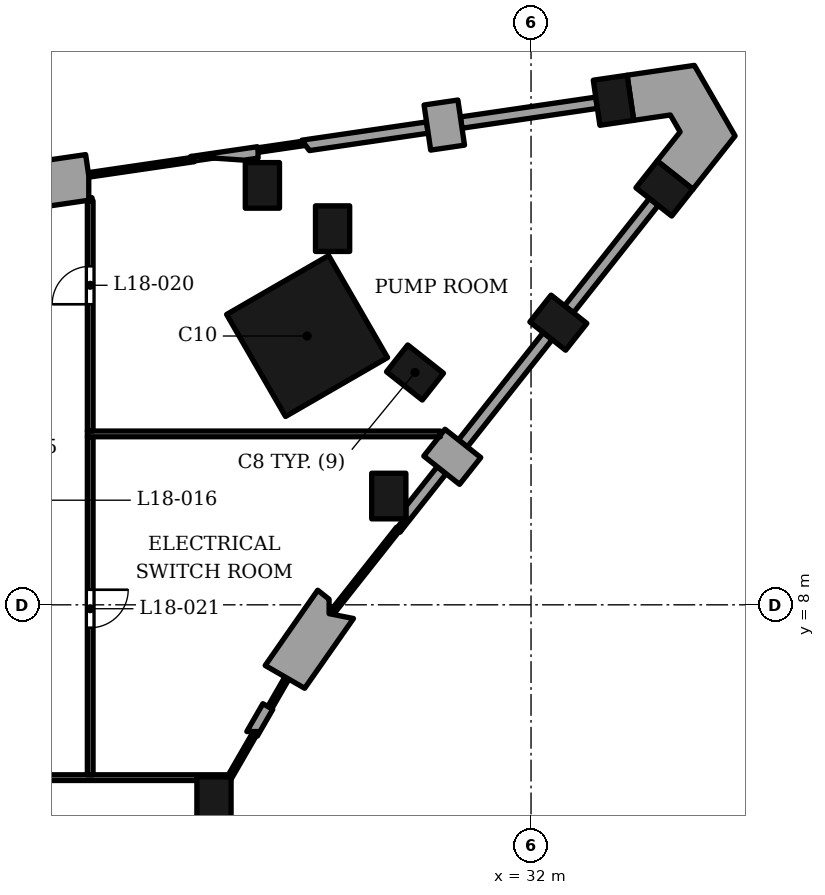
"""IFC4 building model, lengths in metres.
Left out: names, types, materials, properties, quantities, classifications, styles, units other than length and angle.
Written with IfcOpenShell. Run it as: python <this file> out.ifc"""

import sys

from ifc_helpers import new_model, si_unit, direction, frame, frame_2d, origin, origin_2d, place, context, subcontext, project, spatial, polyline, rectangle, outline, extrude, clip, halfspace, element, fill, save


model = new_model("IFC4")
c1 = context("Model", 3, precision=1e-05, world=origin(), true_north=direction((0.0, 1.0)))
c2 = subcontext(c1, "Body", "Model", "MODEL_VIEW")
j1 = project(units=[si_unit("LENGTHUNIT", "METRE"), si_unit("PLANEANGLEUNIT", "RADIAN")], contexts=[c1])
p1 = place(None, origin())
s1 = spatial("IfcSite", under=j1, at=p1, CompositionType="ELEMENT")
p2 = place(p1, origin())
s2 = spatial("IfcBuilding", under=s1, at=p2, CompositionType="ELEMENT")
p3 = place(p2, frame((0.0, 0.0, 86.8)))
s3 = spatial("IfcBuildingStorey", under=s2, at=p3, CompositionType="ELEMENT", Elevation=86.8)
p4 = place(p3, frame((28.947, 14.113, 0.0), z_axis=(0.0, 0.0, 1.0), x_axis=(0.620301172202, 0.784363726701, 0.0)))
e1 = element("IfcColumn", 1, at=p4, inside=s3, PredefinedType="COLUMN", context=c2, shape_type="SweptSolid", body=[
    extrude(rectangle(XDim=0.9, YDim=1.2, at=origin_2d()), origin(), (0.0, 0.0, 1.0), 5.0),
])
p5 = place(p3, frame((26.107, 15.073, 0.0), z_axis=(0.0, 0.0, 1.0), x_axis=(-0.866025447418, -0.499999924425, 0.0)))
e2 = element("IfcColumn", 2, at=p5, inside=s3, PredefinedType="COLUMN", context=c2, shape_type="SweptSolid", body=[
    extrude(rectangle(XDim=3.1, YDim=3.1, at=origin_2d()), origin(), (0.0, 0.0, 1.0), 5.0),
])
for number, where, z_axis, x_axis in (
    (3, (32.719, 15.424, 0.0), (0.0, 0.0, 1.0), (0.62, 0.784, 0.0)),
    (4, (35.51, 18.954, 0.0), (0.0, 0.0, 1.0), (0.62, 0.784, 0.0)),
    (5, (34.17, 21.276, 0.0), (0.0, 0.0, 1.0), (-0.989, -0.145, 0.0)),
):
    element("IfcColumn", number, at=place(p3, frame(where, z_axis=z_axis, x_axis=x_axis)), inside=s3, PredefinedType="COLUMN", context=c2, shape_type="SweptSolid", body=[
        extrude(rectangle(XDim=0.9, YDim=1.2, at=origin_2d()), origin(), (0.0, 0.0, 1.0), 5.0),
    ])
p6 = place(p3, frame((23.657, 2.871, 0.0), z_axis=(0.133016898304, 0.230355520277, 0.963972426495), x_axis=(-0.865991092016, 0.500059425018, 0.0)))
e6 = element("IfcColumn", 6, at=p6, inside=s3, PredefinedType="COLUMN", context=c2, shape_type="Clipping", body=[
    clip(clip(extrude(rectangle(XDim=0.9, YDim=1.2, at=origin_2d()), origin(), (0.0, 0.0, 1.0), 5.187), halfspace(frame((0.0, 0.0, 0.17), z_axis=(0.0, 0.0, 1.0), x_axis=(1.0, 0.0, 0.0)), True)), halfspace(frame((0.0, 0.0, 5.017), z_axis=(0.0, 0.0, 1.0), x_axis=(1.0, 0.0, 0.0)), False)),
])
p7 = place(p3, frame((28.257, 10.862, 0.0), z_axis=(-0.196705937317, -0.437790653176, 0.877294772705), x_axis=(0.912155156516, -0.409845056626, 0.0)))
e7 = element("IfcColumn", 7, at=p7, inside=s3, PredefinedType="COLUMN", context=c2, shape_type="Clipping", body=[
    clip(clip(extrude(rectangle(XDim=0.9, YDim=1.2, at=origin_2d()), origin(), (0.0, 0.0, 1.0), 5.699), halfspace(frame((0.0, 0.0, 0.333), z_axis=(0.0, 0.0, 1.0), x_axis=(1.0, 0.0, 0.0)), True)), halfspace(frame((0.0, 0.0, 5.366), z_axis=(0.0, 0.0, 1.0), x_axis=(1.0, 0.0, 0.0)), False)),
])
p8 = place(p3, frame((26.778, 17.898, 0.0), z_axis=(-0.268875801151, 0.368884218384, 0.889736049052), x_axis=(-0.808114178728, -0.58902586882, 0.0)))
e8 = element("IfcColumn", 8, at=p8, inside=s3, PredefinedType="COLUMN", context=c2, shape_type="Clipping", body=[
    clip(clip(extrude(rectangle(XDim=0.9, YDim=1.2, at=origin_2d()), origin(), (0.0, 0.0, 1.0), 5.62), halfspace(frame((0.0, 0.0, 0.312), z_axis=(0.0, 0.0, 1.0), x_axis=(1.0, 0.0, 0.0)), True)), halfspace(frame((0.0, 0.0, 5.308), z_axis=(0.0, 0.0, 1.0), x_axis=(1.0, 0.0, 0.0)), False)),
])
p9 = place(p3, frame((24.931, 19.036, 0.0), z_axis=(-0.635219622269, 0.043525213878, 0.771104135147), x_axis=(-0.068359659666, -0.997660742402, 0.0)))
e9 = element("IfcColumn", 9, at=p9, inside=s3, PredefinedType="COLUMN", context=c2, shape_type="Clipping", body=[
    clip(clip(extrude(rectangle(XDim=0.9, YDim=1.2, at=origin_2d()), origin(), (0.0, 0.0, 1.0), 6.484), halfspace(frame((0.0, 0.0, 0.501), z_axis=(0.0, 0.0, 1.0), x_axis=(1.0, 0.0, 0.0)), True)), halfspace(frame((0.0, 0.0, 5.983), z_axis=(0.0, 0.0, 1.0), x_axis=(1.0, 0.0, 0.0)), False)),
])
p10 = place(p3, origin())
e10 = element("IfcWall", 10, at=p10, inside=s3, PredefinedType="ELEMENTEDWALL", context=c2, shape_type="SweptSolid", body=[
    extrude(outline(polyline([(24.944, 5.399), (24.521, 4.666), (24.797, 4.666), (24.797, 4.544), (25.204, 5.25), (24.944, 5.399)])), origin(), (0.0, 0.0, 1.0), 3.5),
])
p11 = place(p3, frame((30.398, 11.522, 0.0), z_axis=(0.0, 0.0, 1.0), x_axis=(-0.784330409431, 0.620343299184, 0.0)))
e11 = element("IfcWall", 11, at=p11, inside=s3, PredefinedType="SOLIDWALL", context=c2, shape_type="SweptSolid", body=[
    extrude(rectangle(XDim=1.2, YDim=0.9, at=frame_2d((0.6, 0.0))), origin(), (0.0, 0.0, 1.0), 3.5),
])
p12 = place(p3, origin())
e12 = element("IfcWall", 12, at=p12, inside=s3, PredefinedType="ELEMENTEDWALL", context=c2, shape_type="SweptSolid", body=[
    extrude(outline(polyline([(29.531, 11.635), (28.707, 10.593), (28.707, 10.262), (28.548, 9.908), (29.766, 11.449), (29.531, 11.635)])), origin(), (0.0, 0.0, 1.0), 3.5),
])
p13 = place(p3, frame((30.207, 12.248, 0.0), z_axis=(0.0, 0.0, 1.0), x_axis=(0.620310302622, 0.784356505972, 0.0)))
e13 = element("IfcWall", 13, at=p13, inside=s3, PredefinedType="ELEMENTEDWALL", context=c2, shape_type="SweptSolid", body=[
    extrude(rectangle(XDim=3.6, YDim=0.3, at=frame_2d((1.8, 0.0))), origin(), (0.0, 0.0, 1.0), 3.5),
])
p14 = place(p3, frame((32.998, 15.777, 0.0), z_axis=(0.0, 0.0, 1.0), x_axis=(0.620343299184, 0.784330409431, 0.0)))
e14 = element("IfcWall", 14, at=p14, inside=s3, PredefinedType="ELEMENTEDWALL", context=c2, shape_type="SweptSolid", body=[
    extrude(rectangle(XDim=3.6, YDim=0.3, at=frame_2d((1.8, 0.0))), origin(), (0.0, 0.0, 1.0), 3.5),
])
p15 = place(p3, frame((29.63, 21.217, 0.0), z_axis=(0.0, 0.0, 1.0), x_axis=(0.144867198998, -0.989451107764, 0.0)))
e15 = element("IfcWall", 15, at=p15, inside=s3, PredefinedType="SOLIDWALL", context=c2, shape_type="SweptSolid", body=[
    extrude(rectangle(XDim=1.2, YDim=0.9, at=frame_2d((0.6, 0.0))), origin(), (0.0, 0.0, 1.0), 3.5),
])
p16 = place(p3, frame((33.725, 21.211, 0.0), z_axis=(0.0, 0.0, 1.0), x_axis=(-0.98942335115, -0.145056651687, 0.0)))
e16 = element("IfcWall", 16, at=p16, inside=s3, PredefinedType="ELEMENTEDWALL", context=c2, shape_type="SweptSolid", body=[
    extrude(rectangle(XDim=3.6, YDim=0.3, at=frame_2d((1.8, 0.0))), origin(), (0.0, 0.0, 1.0), 3.5),
])
p17 = place(p3, origin())
e17 = element("IfcWall", 17, at=p17, inside=s3, PredefinedType="ELEMENTEDWALL", context=c2, shape_type="SweptSolid", body=[
    extrude(outline(polyline([(29.25, 20.707), (25.969, 20.226), (26.168, 19.952), (29.294, 20.41), (29.25, 20.707)])), origin(), (0.0, 0.0, 1.0), 3.5),
])
p18 = place(p3, origin())
e18 = element("IfcWall", 18, at=p18, inside=s3, PredefinedType="ELEMENTEDWALL", context=c2, shape_type="SweptSolid", body=[
    extrude(outline(polyline([(24.798, 20.054), (23.04, 19.796), (24.45, 19.7), (24.817, 19.753), (24.817, 19.923), (24.798, 20.054)])), origin(), (0.0, 0.0, 1.0), 3.5),
])
p19 = place(p3, origin())
e19 = element("IfcWall", 19, at=p19, inside=s3, PredefinedType="SOLIDWALL", context=c2, shape_type="SweptSolid", body=[
    extrude(outline(polyline([(25.004, 6.404), (26.044, 5.804), (27.328, 7.64), (26.686, 7.767), (26.686, 8.147), (26.386, 8.384), (25.004, 6.404)])), origin(), (0.0, 0.0, 1.0), 3.5),
])
p20 = place(p3, origin())
e20 = element("IfcWall", 20, at=p20, inside=s3, PredefinedType="SOLIDWALL", context=c2, shape_type="SweptSolid", body=[
    extrude(outline(polyline([(35.319, 19.679), (36.26, 18.935), (37.37, 20.338), (36.298, 22.194), (34.528, 21.935), (34.702, 20.748), (35.666, 20.889), (35.923, 20.443), (35.319, 19.679)])), origin(), (0.0, 0.0, 1.0), 3.5),
])
p21 = place(p3, origin())
e21 = element("IfcWall", 21, at=p21, inside=s3, PredefinedType="SOLIDWALL", context=c2, shape_type="SweptSolid", body=[
    extrude(outline(polyline([(18.899, 19.644), (20.28, 19.847), (20.362, 19.288), (20.362, 18.718), (20.447, 18.712), (20.454, 18.659), (19.073, 18.457), (18.899, 19.644)])), origin(), (0.0, 0.0, 1.0), 3.5),
])
p22 = place(p3, frame((22.89, 1.422, 0.0), z_axis=(0.0, 0.0, 1.0), x_axis=(0.499887206002, 0.866090515637, 0.0)))
e22 = element("IfcWall", 22, at=p22, inside=s3, PredefinedType="SOLIDWALL", context=c2, shape_type="SweptSolid", body=[
    extrude(rectangle(XDim=1.24, YDim=0.12, at=frame_2d((0.62, 0.0))), origin(), (0.0, 0.0, 1.0), 3.5),
])
p23 = place(p3, frame((23.915, 3.197, 0.0), z_axis=(0.0, 0.0, 1.0), x_axis=(0.500061797536, 0.86598972202, 0.0)))
e23 = element("IfcWall", 23, at=p23, inside=s3, PredefinedType="SOLIDWALL", context=c2, shape_type="SweptSolid", body=[
    extrude(rectangle(XDim=1.64, YDim=0.12, at=frame_2d((0.82, 0.0))), origin(), (0.0, 0.0, 1.0), 3.5),
])
p24 = place(p3, frame((25.14, 5.319, 0.0), z_axis=(0.0, 0.0, 1.0), x_axis=(0.499982246889, 0.866035653305, 0.0)))
e24 = element("IfcWall", 24, at=p24, inside=s3, PredefinedType="SOLIDWALL", context=c2, shape_type="SweptSolid", body=[
    extrude(rectangle(XDim=0.868, YDim=0.12, at=frame_2d((0.434, 0.0))), origin(), (0.0, 0.0, 1.0), 3.5),
])
p25 = place(p3, frame((26.81, 7.856, 0.0), z_axis=(0.0, 0.0, 1.0), x_axis=(0.620317179472, 0.78435106735, 0.0)))
e25 = element("IfcWall", 25, at=p25, inside=s3, PredefinedType="SOLIDWALL", context=c2, shape_type="SweptSolid", body=[
    extrude(rectangle(XDim=2.74, YDim=0.12, at=frame_2d((1.37, 0.0))), origin(), (0.0, 0.0, 1.0), 3.5),
])
p26 = place(p3, frame((26.05, 20.146, 0.0), z_axis=(0.0, 0.0, 1.0), x_axis=(-0.989419059386, -0.145085922556, 0.0)))
e26 = element("IfcWall", 26, at=p26, inside=s3, PredefinedType="SOLIDWALL", context=c2, shape_type="SweptSolid", body=[
    extrude(rectangle(XDim=1.24, YDim=0.12, at=frame_2d((0.62, 0.0))), origin(), (0.0, 0.0, 1.0), 3.5),
])
p27 = place(p3, frame((20.37, 19.314, 0.0), z_axis=(0.0, 0.0, 1.0), x_axis=(0.989431994424, 0.144997684157, 0.0)))
e27 = element("IfcWall", 27, at=p27, inside=s3, PredefinedType="SOLIDWALL", context=c2, shape_type="SweptSolid", body=[
    extrude(rectangle(XDim=2.79, YDim=0.12, at=frame_2d((1.395, 0.0))), origin(), (0.0, 0.0, 1.0), 3.5),
])
p28 = place(p3, frame((5.895, 3.453, 0.0), z_axis=(0.0, 0.0, 1.0), x_axis=(1.0, 0.0, 0.0)))
e28 = element("IfcWall", 28, at=p28, inside=s3, PredefinedType="PARTITIONING", context=c2, shape_type="SweptSolid", body=[
    extrude(rectangle(XDim=18.118, YDim=0.15, at=frame_2d((9.059, 0.0))), origin(), (0.0, 0.0, 1.0), 3.752),
])
p29 = place(p28, frame((5.505, 0.0, 0.0)))
e29 = element("IfcOpeningElement", 29, at=p29, cuts=e28, PredefinedType="OPENING", context=c2, shape_type="SweptSolid", body=[
    extrude(rectangle(XDim=1.0, YDim=2.1, at=frame_2d((0.5, 1.05))), frame((0.0, 0.085, 0.0), z_axis=(0.0, -1.0, 0.0), x_axis=(1.0, 0.0, 0.0)), (0.0, 0.0, 1.0), 0.17),
])
p30 = place(p3, frame((20.4, 3.528, 0.0), z_axis=(0.0, 0.0, 1.0), x_axis=(0.0, 1.0, 0.0)))
e30 = element("IfcWall", 30, at=p30, inside=s3, PredefinedType="PARTITIONING", context=c2, shape_type="SweptSolid", body=[
    extrude(rectangle(XDim=8.895, YDim=0.15, at=frame_2d((4.447, 0.0))), origin(), (0.0, 0.0, 1.0), 4.05),
])
p31 = place(p30, frame((3.869, 0.0, 0.0)))
e31 = element("IfcOpeningElement", 31, at=p31, cuts=e30, PredefinedType="OPENING", context=c2, shape_type="SweptSolid", body=[
    extrude(rectangle(XDim=1.0, YDim=2.1, at=frame_2d((0.5, 1.05))), frame((0.0, 0.085, 0.0), z_axis=(0.0, -1.0, 0.0), x_axis=(1.0, 0.0, 0.0)), (0.0, 0.0, 1.0), 0.17),
])
p32 = place(p3, frame((20.325, 12.497, 0.0), z_axis=(0.0, 0.0, 1.0), x_axis=(1.0, 0.0, 0.0)))
e32 = element("IfcWall", 32, at=p32, inside=s3, PredefinedType="PARTITIONING", context=c2, shape_type="SweptSolid", body=[
    extrude(rectangle(XDim=9.289, YDim=0.15, at=frame_2d((4.644, 0.0))), origin(), (0.0, 0.0, 1.0), 4.152),
])
p33 = place(p3, frame((20.4, 12.572, 0.0), z_axis=(0.0, 0.0, 1.0), x_axis=(0.0, 1.0, 0.0)))
e33 = element("IfcWall", 33, at=p33, inside=s3, PredefinedType="PARTITIONING", context=c2, shape_type="SweptSolid", body=[
    extrude(rectangle(XDim=6.059, YDim=0.15, at=frame_2d((3.03, 0.0))), origin(), (0.0, 0.0, 1.0), 3.752),
])
p34 = place(p33, frame((3.336, 0.0, 0.0)))
e34 = element("IfcOpeningElement", 34, at=p34, cuts=e33, PredefinedType="OPENING", context=c2, shape_type="SweptSolid", body=[
    extrude(rectangle(XDim=1.0, YDim=2.1, at=frame_2d((0.5, 1.05))), frame((0.0, 0.085, 0.0), z_axis=(0.0, -1.0, 0.0), x_axis=(1.0, 0.0, 0.0)), (0.0, 0.0, 1.0), 0.17),
])
p35 = place(p34, origin())
e35 = element("IfcDoor", 35, at=p35, inside=s3, OperationType="SINGLE_SWING_LEFT", PredefinedType="DOOR", context=c2, shape_type="SweptSolid", body=[
    extrude(rectangle(XDim=1.0, YDim=2.1, at=frame_2d((0.5, 1.05))), frame((0.0, 0.025, 0.0), z_axis=(0.0, -1.0, 0.0), x_axis=(1.0, 0.0, 0.0)), (0.0, 0.0, 1.0), 0.05),
])
fill(e34, e35)
p36 = place(p31, origin())
e36 = element("IfcDoor", 36, at=p36, inside=s3, OperationType="SINGLE_SWING_RIGHT", PredefinedType="DOOR", context=c2, shape_type="SweptSolid", body=[
    extrude(rectangle(XDim=1.0, YDim=2.1, at=frame_2d((0.5, 1.05))), frame((0.0, 0.025, 0.0), z_axis=(0.0, -1.0, 0.0), x_axis=(1.0, 0.0, 0.0)), (0.0, 0.0, 1.0), 0.05),
])
fill(e31, e36)
save(model, sys.argv[1])
